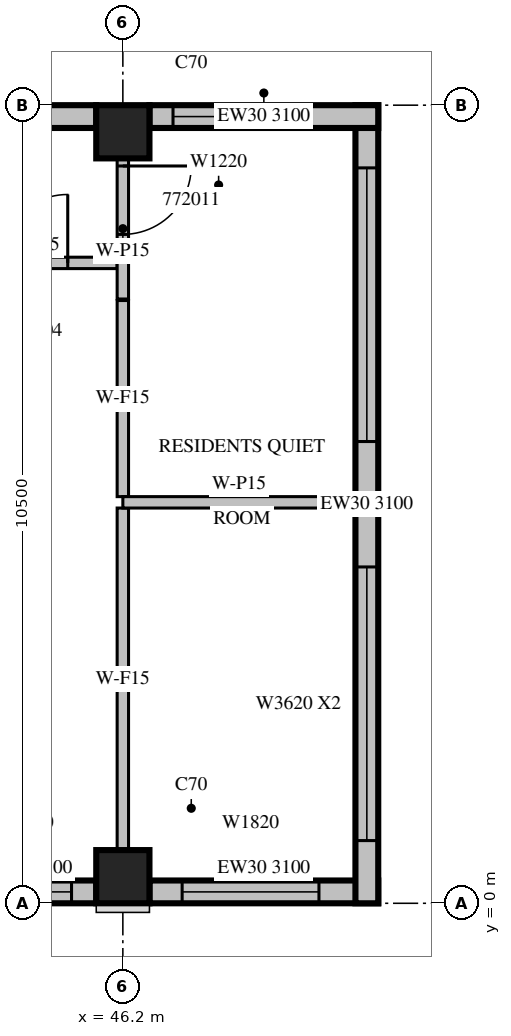
"""IFC4 building model, lengths in metres.
Left out: names, types, materials, properties, quantities, classifications, styles, units other than length and angle.
Written with IfcOpenShell. Run it as: python <this file> out.ifc"""

import sys

from ifc_helpers import new_model, si_unit, direction, frame, frame_2d, origin, origin_2d, place, context, subcontext, project, spatial, rectangle, extrude, source, transform, mapped, element, fill, save


model = new_model("IFC4")
c1 = context("Model", 3, precision=1e-05, world=origin(), true_north=direction((0.0, 1.0)))
c2 = subcontext(c1, "Body", "Model", "MODEL_VIEW")
j1 = project(units=[si_unit("LENGTHUNIT", "METRE"), si_unit("PLANEANGLEUNIT", "RADIAN")], contexts=[c1])
p1 = place(None, origin())
s1 = spatial("IfcSite", under=j1, at=p1, CompositionType="ELEMENT")
p2 = place(p1, origin())
s2 = spatial("IfcBuilding", under=s1, at=p2, CompositionType="ELEMENT")
p3 = place(p2, frame((0.0, 0.0, 312.5)))
s3 = spatial("IfcBuildingStorey", under=s2, at=p3, CompositionType="ELEMENT", Elevation=312.5)
m1 = source(origin(), c2, "Body", "SweptSolid", [
    extrude(rectangle(XDim=0.7, YDim=0.7, at=origin_2d()), origin(), (0.0, 0.0, 1.0), 3.5),
])
for number, where, z_axis, x_axis in (
    (1, (46.2, 0.35, 0.0), (0.0, 0.0, 1.0), (1.0, 0.0, 0.0)),
    (2, (46.2, 10.15, 0.0), (0.0, 0.0, 1.0), (1.0, 0.0, 0.0)),
):
    element("IfcColumn", number, at=place(p3, frame(where, z_axis=z_axis, x_axis=x_axis)), inside=s3, PredefinedType="COLUMN", context=c2, shape_type="MappedRepresentation", body=[
        mapped(m1, transform((0.0, 0.0, 0.0), scale=1.0)),
    ])
m2 = source(origin(), c2, "Body", "SweptSolid", [
    extrude(rectangle(XDim=1.85, YDim=0.3, at=frame_2d((0.925, 0.0))), origin(), (0.0, 0.0, 1.0), 3.1),
])
p4 = place(p3, frame((44.0, 0.15, 0.0), z_axis=(0.0, 0.0, 1.0), x_axis=(1.0, 0.0, 0.0)))
e3 = element("IfcWall", 3, at=p4, inside=s3, PredefinedType="STANDARD", context=c2, shape_type="MappedRepresentation", body=[
    mapped(m2, transform((0.0, 0.0, 0.0), scale=1.0)),
])
m3 = source(origin(), c2, "Body", "SweptSolid", [
    extrude(rectangle(XDim=1.2, YDim=2.0, at=frame_2d((0.6, 1.0))), frame((0.0, 0.16, 0.0), z_axis=(0.0, -1.0, 0.0), x_axis=(1.0, 0.0, 0.0)), (0.0, 0.0, 1.0), 0.32),
])
p5 = place(p4, frame((0.325, 0.0, 0.6)))
e4 = element("IfcOpeningElement", 4, at=p5, cuts=e3, PredefinedType="OPENING", context=c2, shape_type="MappedRepresentation", body=[
    mapped(m3, transform((0.0, 0.0, 0.0), scale=1.0)),
])
m4 = source(origin(), c2, "Body", "SweptSolid", [
    extrude(rectangle(XDim=3.01, YDim=0.3, at=frame_2d((1.505, 0.0))), origin(), (0.0, 0.0, 1.0), 3.1),
])
p6 = place(p3, frame((46.55, 0.15, 0.0), z_axis=(0.0, 0.0, 1.0), x_axis=(1.0, 0.0, 0.0)))
e5 = element("IfcWall", 5, at=p6, inside=s3, PredefinedType="STANDARD", context=c2, shape_type="MappedRepresentation", body=[
    mapped(m4, transform((0.0, 0.0, 0.0), scale=1.0)),
])
m5 = source(origin(), c2, "Body", "SweptSolid", [
    extrude(rectangle(XDim=1.8, YDim=2.0, at=frame_2d((0.9, 1.0))), frame((0.0, 0.16, 0.0), z_axis=(0.0, -1.0, 0.0), x_axis=(1.0, 0.0, 0.0)), (0.0, 0.0, 1.0), 0.32),
])
p7 = place(p6, frame((0.43, 0.0, 0.6)))
e6 = element("IfcOpeningElement", 6, at=p7, cuts=e5, PredefinedType="OPENING", context=c2, shape_type="MappedRepresentation", body=[
    mapped(m5, transform((0.0, 0.0, 0.0), scale=1.0)),
])
m6 = source(origin(), c2, "Body", "SweptSolid", [
    extrude(rectangle(XDim=10.5, YDim=0.3, at=frame_2d((5.25, 0.0))), origin(), (0.0, 0.0, 1.0), 3.1),
])
p8 = place(p3, frame((49.41, 0.0, 0.0), z_axis=(0.0, 0.0, 1.0), x_axis=(0.0, 1.0, 0.0)))
e7 = element("IfcWall", 7, at=p8, inside=s3, PredefinedType="STANDARD", context=c2, shape_type="MappedRepresentation", body=[
    mapped(m6, transform((0.0, 0.0, 0.0), scale=1.0)),
])
m7 = source(origin(), c2, "Body", "SweptSolid", [
    extrude(rectangle(XDim=3.6, YDim=2.0, at=frame_2d((1.8, 1.0))), frame((0.0, 0.16, 0.0), z_axis=(0.0, -1.0, 0.0), x_axis=(1.0, 0.0, 0.0)), (0.0, 0.0, 1.0), 0.32),
])
p9 = place(p8, frame((0.825, 0.0, 0.6)))
e8 = element("IfcOpeningElement", 8, at=p9, cuts=e7, PredefinedType="OPENING", context=c2, shape_type="MappedRepresentation", body=[
    mapped(m7, transform((0.0, 0.0, 0.0), scale=1.0)),
])
p10 = place(p8, frame((6.075, 0.0, 0.6)))
e9 = element("IfcOpeningElement", 9, at=p10, cuts=e7, PredefinedType="OPENING", context=c2, shape_type="MappedRepresentation", body=[
    mapped(m7, transform((0.0, 0.0, 0.0), scale=1.0)),
])
p11 = place(p3, frame((49.56, 10.35, 0.0), z_axis=(0.0, 0.0, 1.0), x_axis=(-1.0, 0.0, 0.0)))
e10 = element("IfcWall", 10, at=p11, inside=s3, PredefinedType="STANDARD", context=c2, shape_type="MappedRepresentation", body=[
    mapped(m4, transform((0.0, 0.0, 0.0), scale=1.0)),
])
p12 = place(p11, frame((1.5, 0.0, 0.6)))
e11 = element("IfcOpeningElement", 11, at=p12, cuts=e10, PredefinedType="OPENING", context=c2, shape_type="MappedRepresentation", body=[
    mapped(m3, transform((0.0, 0.0, 0.0), scale=1.0)),
])
m8 = source(origin(), c2, "Body", "SweptSolid", [
    extrude(rectangle(XDim=7.7, YDim=0.3, at=frame_2d((3.85, 0.0))), origin(), (0.0, 0.0, 1.0), 3.1),
])
p13 = place(p3, frame((45.85, 10.35, 0.0), z_axis=(0.0, 0.0, 1.0), x_axis=(-1.0, 0.0, 0.0)))
e12 = element("IfcWall", 12, at=p13, inside=s3, PredefinedType="STANDARD", context=c2, shape_type="MappedRepresentation", body=[
    mapped(m8, transform((0.0, 0.0, 0.0), scale=1.0)),
])
m9 = source(origin(), c2, "Body", "SweptSolid", [
    extrude(rectangle(XDim=3.0, YDim=2.0, at=frame_2d((1.5, 1.0))), frame((0.0, 0.16, 0.0), z_axis=(0.0, -1.0, 0.0), x_axis=(1.0, 0.0, 0.0)), (0.0, 0.0, 1.0), 0.32),
])
p14 = place(p13, frame((1.09, 0.0, 0.6)))
e13 = element("IfcOpeningElement", 13, at=p14, cuts=e12, PredefinedType="OPENING", context=c2, shape_type="MappedRepresentation", body=[
    mapped(m9, transform((0.0, 0.0, 0.0), scale=1.0)),
])
p15 = place(p13, frame((6.19, 0.0, 0.6)))
e14 = element("IfcOpeningElement", 14, at=p15, cuts=e12, PredefinedType="OPENING", context=c2, shape_type="MappedRepresentation", body=[
    mapped(m3, transform((0.0, 0.0, 0.0), scale=1.0)),
])
m10 = source(origin(), c2, "Body", "SweptSolid", [
    extrude(rectangle(XDim=2.2, YDim=0.15, at=frame_2d((1.1, 0.0))), origin(), (0.0, 0.0, 1.0), 3.1),
])
p16 = place(p3, frame((46.125, 8.425, 0.0), z_axis=(0.0, 0.0, 1.0), x_axis=(-1.0, 0.0, 0.0)))
e15 = element("IfcWall", 15, at=p16, inside=s3, PredefinedType="PARTITIONING", context=c2, shape_type="MappedRepresentation", body=[
    mapped(m10, transform((0.0, 0.0, 0.0), scale=1.0)),
])
m11 = source(origin(), c2, "Body", "SweptSolid", [
    extrude(rectangle(XDim=0.9, YDim=2.1, at=frame_2d((0.45, 1.05))), frame((0.0, 0.085, 0.0), z_axis=(0.0, -1.0, 0.0), x_axis=(1.0, 0.0, 0.0)), (0.0, 0.0, 1.0), 0.17),
])
p17 = place(p16, frame((0.65, 0.0, 0.0)))
e16 = element("IfcOpeningElement", 16, at=p17, cuts=e15, PredefinedType="OPENING", context=c2, shape_type="MappedRepresentation", body=[
    mapped(m11, transform((0.0, 0.0, 0.0), scale=1.0)),
])
m12 = source(origin(), c2, "Body", "SweptSolid", [
    extrude(rectangle(XDim=1.851, YDim=0.15, at=frame_2d((0.925, 0.0))), origin(), (0.0, 0.0, 1.0), 3.1),
])
p18 = place(p3, frame((46.2, 9.801, 0.0), z_axis=(0.0, 0.0, 1.0), x_axis=(0.0, -1.0, 0.0)))
e17 = element("IfcWall", 17, at=p18, inside=s3, PredefinedType="PARTITIONING", context=c2, shape_type="MappedRepresentation", body=[
    mapped(m12, transform((0.0, 0.0, 0.0), scale=1.0)),
])
p19 = place(p18, frame((0.101, 0.0, 0.0)))
e18 = element("IfcOpeningElement", 18, at=p19, cuts=e17, PredefinedType="OPENING", context=c2, shape_type="MappedRepresentation", body=[
    mapped(m11, transform((0.0, 0.0, 0.0), scale=1.0)),
])
m13 = source(origin(), c2, "Body", "SweptSolid", [
    extrude(rectangle(XDim=4.501, YDim=0.15, at=frame_2d((2.251, 0.0))), origin(), (0.0, 0.0, 1.0), 3.1),
])
p20 = place(p3, frame((46.2, 0.699, 0.0), z_axis=(0.0, 0.0, 1.0), x_axis=(0.0, 1.0, 0.0)))
e19 = element("IfcWall", 19, at=p20, inside=s3, PredefinedType="PARTITIONING", context=c2, shape_type="MappedRepresentation", body=[
    mapped(m13, transform((0.0, 0.0, 0.0), scale=1.0)),
])
p21 = place(p3, frame((46.2, 5.35, 0.0), z_axis=(0.0, 0.0, 1.0), x_axis=(0.0, 1.0, 0.0)))
e20 = element("IfcWall", 20, at=p21, inside=s3, PredefinedType="PARTITIONING", context=c2, shape_type="SweptSolid", body=[
    extrude(rectangle(XDim=2.58, YDim=0.15, at=frame_2d((1.29, 0.0))), origin(), (0.0, 0.0, 1.0), 3.1),
])
m14 = source(origin(), c2, "Body", "SweptSolid", [
    extrude(rectangle(XDim=3.06, YDim=0.15, at=frame_2d((1.53, 0.0))), origin(), (0.0, 0.0, 1.0), 3.1),
])
p22 = place(p3, frame((49.26, 5.275, 0.0), z_axis=(0.0, 0.0, 1.0), x_axis=(-1.0, 0.0, 0.0)))
e21 = element("IfcWall", 21, at=p22, inside=s3, PredefinedType="PARTITIONING", context=c2, shape_type="MappedRepresentation", body=[
    mapped(m14, transform((0.0, 0.0, 0.0), scale=1.0)),
])
m15 = source(origin(), c2, "Body", "SweptSolid", [
    extrude(rectangle(XDim=1.2, YDim=2.0, at=frame_2d((0.6, 1.0))), frame((0.0, 0.03, 0.0), z_axis=(0.0, -1.0, 0.0), x_axis=(1.0, 0.0, 0.0)), (0.0, 0.0, 1.0), 0.06),
])
p23 = place(p5, origin())
e22 = element("IfcWindow", 22, at=p23, inside=s3, PartitioningType="SINGLE_PANEL", PredefinedType="WINDOW", context=c2, shape_type="MappedRepresentation", body=[
    mapped(m15, transform((0.0, 0.0, 0.0), scale=1.0)),
])
fill(e4, e22)
m16 = source(origin(), c2, "Body", "SweptSolid", [
    extrude(rectangle(XDim=1.8, YDim=2.0, at=frame_2d((0.9, 1.0))), frame((0.0, 0.03, 0.0), z_axis=(0.0, -1.0, 0.0), x_axis=(1.0, 0.0, 0.0)), (0.0, 0.0, 1.0), 0.06),
])
p24 = place(p7, origin())
e23 = element("IfcWindow", 23, at=p24, inside=s3, PartitioningType="SINGLE_PANEL", PredefinedType="WINDOW", context=c2, shape_type="MappedRepresentation", body=[
    mapped(m16, transform((0.0, 0.0, 0.0), scale=1.0)),
])
fill(e6, e23)
m17 = source(origin(), c2, "Body", "SweptSolid", [
    extrude(rectangle(XDim=3.6, YDim=2.0, at=frame_2d((1.8, 1.0))), frame((0.0, 0.03, 0.0), z_axis=(0.0, -1.0, 0.0), x_axis=(1.0, 0.0, 0.0)), (0.0, 0.0, 1.0), 0.06),
])
p25 = place(p9, origin())
e24 = element("IfcWindow", 24, at=p25, inside=s3, PartitioningType="SINGLE_PANEL", PredefinedType="WINDOW", context=c2, shape_type="MappedRepresentation", body=[
    mapped(m17, transform((0.0, 0.0, 0.0), scale=1.0)),
])
fill(e8, e24)
p26 = place(p10, origin())
e25 = element("IfcWindow", 25, at=p26, inside=s3, PartitioningType="SINGLE_PANEL", PredefinedType="WINDOW", context=c2, shape_type="MappedRepresentation", body=[
    mapped(m17, transform((0.0, 0.0, 0.0), scale=1.0)),
])
fill(e9, e25)
p27 = place(p12, origin())
e26 = element("IfcWindow", 26, at=p27, inside=s3, PartitioningType="SINGLE_PANEL", PredefinedType="WINDOW", context=c2, shape_type="MappedRepresentation", body=[
    mapped(m15, transform((0.0, 0.0, 0.0), scale=1.0)),
])
fill(e11, e26)
m18 = source(origin(), c2, "Body", "SweptSolid", [
    extrude(rectangle(XDim=0.9, YDim=2.1, at=frame_2d((0.45, 1.05))), frame((0.0, 0.025, 0.0), z_axis=(0.0, -1.0, 0.0), x_axis=(1.0, 0.0, 0.0)), (0.0, 0.0, 1.0), 0.05),
])
p28 = place(p17, origin())
e27 = element("IfcDoor", 27, at=p28, inside=s3, OperationType="SINGLE_SWING_RIGHT", PredefinedType="DOOR", context=c2, shape_type="MappedRepresentation", body=[
    mapped(m18, transform((0.0, 0.0, 0.0), scale=1.0)),
])
fill(e16, e27)
p29 = place(p19, origin())
e28 = element("IfcDoor", 28, at=p29, inside=s3, OperationType="SINGLE_SWING_LEFT", PredefinedType="DOOR", context=c2, shape_type="MappedRepresentation", body=[
    mapped(m18, transform((0.0, 0.0, 0.0), scale=1.0)),
])
fill(e18, e28)
save(model, sys.argv[1])
